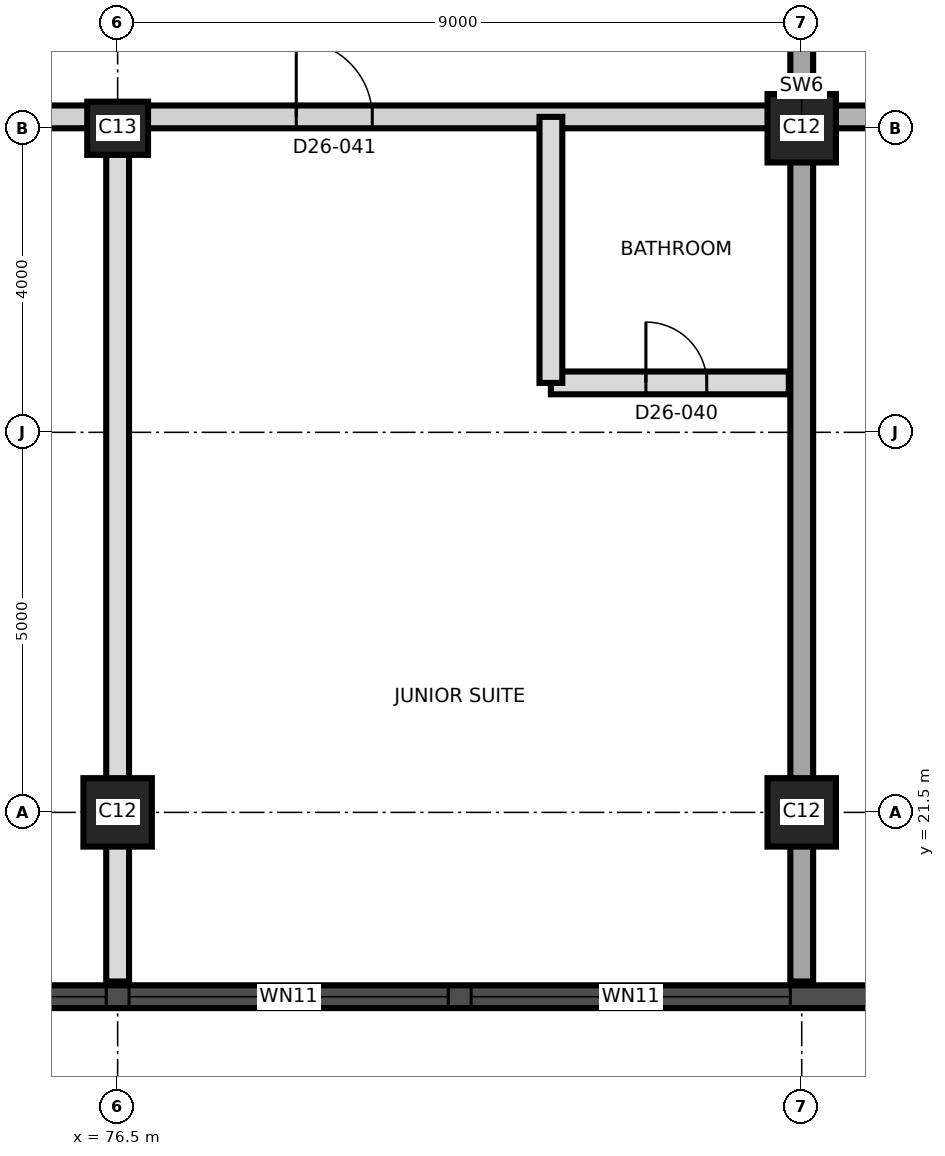
"""IFC4 building model, lengths in metres.
Left out: names, types, materials, properties, quantities, classifications, styles, units other than length and angle.
Written with IfcOpenShell. Run it as: python <this file> out.ifc"""

import sys

from ifc_helpers import new_model, si_unit, direction, frame, frame_2d, origin, origin_2d, place, context, subcontext, project, spatial, rectangle, extrude, element, fill, save


model = new_model("IFC4")
c1 = context("Model", 3, precision=1e-05, world=origin(), true_north=direction((0.0, 1.0)))
c2 = subcontext(c1, "Body", "Model", "MODEL_VIEW")
j1 = project(units=[si_unit("LENGTHUNIT", "METRE"), si_unit("PLANEANGLEUNIT", "RADIAN")], contexts=[c1])
p1 = place(None, origin())
s1 = spatial("IfcSite", under=j1, at=p1, CompositionType="ELEMENT")
p2 = place(p1, origin())
s2 = spatial("IfcBuilding", under=s1, at=p2, CompositionType="ELEMENT")
p3 = place(p2, frame((0.0, 0.0, 236.5)))
s3 = spatial("IfcBuildingStorey", under=s2, at=p3, CompositionType="ELEMENT", Elevation=236.5)
for number, where, z_axis, x_axis in (
    (1, (76.5, 21.5, 0.0), (0.0, 0.0, 1.0), (1.0, 0.0, 0.0)),
    (2, (85.5, 21.5, 0.0), (0.0, 0.0, 1.0), (1.0, 0.0, 0.0)),
):
    element("IfcColumn", number, at=place(p3, frame(where, z_axis=z_axis, x_axis=x_axis)), inside=s3, PredefinedType="COLUMN", context=c2, shape_type="SweptSolid", body=[
        extrude(rectangle(XDim=0.9, YDim=0.9, at=origin_2d()), origin(), (0.0, 0.0, 1.0), 3.7),
    ])
p4 = place(p3, frame((76.5, 30.5, 0.0), z_axis=(0.0, 0.0, 1.0), x_axis=(1.0, 0.0, 0.0)))
e3 = element("IfcColumn", 3, at=p4, inside=s3, PredefinedType="COLUMN", context=c2, shape_type="SweptSolid", body=[
    extrude(rectangle(XDim=0.8, YDim=0.7, at=origin_2d()), origin(), (0.0, 0.0, 1.0), 3.7),
])
p5 = place(p3, frame((85.5, 30.5, 0.0), z_axis=(0.0, 0.0, 1.0), x_axis=(1.0, 0.0, 0.0)))
e4 = element("IfcColumn", 4, at=p5, inside=s3, PredefinedType="COLUMN", context=c2, shape_type="SweptSolid", body=[
    extrude(rectangle(XDim=0.9, YDim=0.9, at=origin_2d()), origin(), (0.0, 0.0, 1.0), 3.7),
])
p6 = place(p3, frame((85.5, 19.275, 0.0), z_axis=(0.0, 0.0, 1.0), x_axis=(0.0, 1.0, 0.0)))
e5 = element("IfcWall", 5, at=p6, inside=s3, PredefinedType="SHEAR", context=c2, shape_type="SweptSolid", body=[
    extrude(rectangle(XDim=22.45, YDim=0.3, at=frame_2d((11.225, 0.0))), origin(), (0.0, 0.0, 1.0), 3.7),
])
p7 = place(p6, frame((12.425, 0.0, 0.0)))
e6 = element("IfcOpeningElement", 6, at=p7, cuts=e5, PredefinedType="OPENING", context=c2, shape_type="SweptSolid", body=[
    extrude(rectangle(XDim=1.4, YDim=2.1, at=frame_2d((0.7, 1.05))), frame((0.0, 0.16, 0.0), z_axis=(0.0, -1.0, 0.0), x_axis=(1.0, 0.0, 0.0)), (0.0, 0.0, 1.0), 0.32),
])
p8 = place(p3, frame((44.01, 19.075, 0.0), z_axis=(0.0, 0.0, 1.0), x_axis=(1.0, 0.0, 0.0)))
e7 = element("IfcWall", 7, at=p8, inside=s3, PredefinedType="SOLIDWALL", context=c2, shape_type="SweptSolid", body=[
    extrude(rectangle(XDim=43.478, YDim=0.3, at=frame_2d((21.739, 0.0))), origin(), (0.0, 0.0, 1.0), 3.4),
])
p9 = place(p8, frame((1.845, 0.0, 0.3)))
e8 = element("IfcOpeningElement", 8, at=p9, cuts=e7, PredefinedType="OPENING", context=c2, shape_type="SweptSolid", body=[
    extrude(rectangle(XDim=1.8, YDim=2.4, at=frame_2d((0.9, 1.2))), frame((0.0, 0.16, 0.0), z_axis=(0.0, -1.0, 0.0), x_axis=(1.0, 0.0, 0.0)), (0.0, 0.0, 1.0), 0.32),
])
p10 = place(p8, frame((5.64, 0.0, 0.9)))
e9 = element("IfcOpeningElement", 9, at=p10, cuts=e7, PredefinedType="OPENING", context=c2, shape_type="SweptSolid", body=[
    extrude(rectangle(XDim=4.2, YDim=1.5, at=frame_2d((2.1, 0.75))), frame((0.0, 0.16, 0.0), z_axis=(0.0, -1.0, 0.0), x_axis=(1.0, 0.0, 0.0)), (0.0, 0.0, 1.0), 0.32),
])
p11 = place(p8, frame((10.14, 0.0, 0.9)))
e10 = element("IfcOpeningElement", 10, at=p11, cuts=e7, PredefinedType="OPENING", context=c2, shape_type="SweptSolid", body=[
    extrude(rectangle(XDim=4.2, YDim=1.5, at=frame_2d((2.1, 0.75))), frame((0.0, 0.16, 0.0), z_axis=(0.0, -1.0, 0.0), x_axis=(1.0, 0.0, 0.0)), (0.0, 0.0, 1.0), 0.32),
])
p12 = place(p8, frame((14.64, 0.0, 0.9)))
e11 = element("IfcOpeningElement", 11, at=p12, cuts=e7, PredefinedType="OPENING", context=c2, shape_type="SweptSolid", body=[
    extrude(rectangle(XDim=4.2, YDim=1.5, at=frame_2d((2.1, 0.75))), frame((0.0, 0.16, 0.0), z_axis=(0.0, -1.0, 0.0), x_axis=(1.0, 0.0, 0.0)), (0.0, 0.0, 1.0), 0.32),
])
p13 = place(p8, frame((19.14, 0.0, 0.9)))
e12 = element("IfcOpeningElement", 12, at=p13, cuts=e7, PredefinedType="OPENING", context=c2, shape_type="SweptSolid", body=[
    extrude(rectangle(XDim=4.2, YDim=1.5, at=frame_2d((2.1, 0.75))), frame((0.0, 0.16, 0.0), z_axis=(0.0, -1.0, 0.0), x_axis=(1.0, 0.0, 0.0)), (0.0, 0.0, 1.0), 0.32),
])
p14 = place(p8, frame((23.64, 0.0, 0.9)))
e13 = element("IfcOpeningElement", 13, at=p14, cuts=e7, PredefinedType="OPENING", context=c2, shape_type="SweptSolid", body=[
    extrude(rectangle(XDim=4.2, YDim=1.5, at=frame_2d((2.1, 0.75))), frame((0.0, 0.16, 0.0), z_axis=(0.0, -1.0, 0.0), x_axis=(1.0, 0.0, 0.0)), (0.0, 0.0, 1.0), 0.32),
])
p15 = place(p8, frame((28.14, 0.0, 0.9)))
e14 = element("IfcOpeningElement", 14, at=p15, cuts=e7, PredefinedType="OPENING", context=c2, shape_type="SweptSolid", body=[
    extrude(rectangle(XDim=4.2, YDim=1.5, at=frame_2d((2.1, 0.75))), frame((0.0, 0.16, 0.0), z_axis=(0.0, -1.0, 0.0), x_axis=(1.0, 0.0, 0.0)), (0.0, 0.0, 1.0), 0.32),
])
p16 = place(p8, frame((32.64, 0.0, 0.9)))
e15 = element("IfcOpeningElement", 15, at=p16, cuts=e7, PredefinedType="OPENING", context=c2, shape_type="SweptSolid", body=[
    extrude(rectangle(XDim=4.2, YDim=1.5, at=frame_2d((2.1, 0.75))), frame((0.0, 0.16, 0.0), z_axis=(0.0, -1.0, 0.0), x_axis=(1.0, 0.0, 0.0)), (0.0, 0.0, 1.0), 0.32),
])
p17 = place(p8, frame((37.14, 0.0, 0.9)))
e16 = element("IfcOpeningElement", 16, at=p17, cuts=e7, PredefinedType="OPENING", context=c2, shape_type="SweptSolid", body=[
    extrude(rectangle(XDim=4.2, YDim=1.5, at=frame_2d((2.1, 0.75))), frame((0.0, 0.16, 0.0), z_axis=(0.0, -1.0, 0.0), x_axis=(1.0, 0.0, 0.0)), (0.0, 0.0, 1.0), 0.32),
])
p18 = place(p3, frame((82.2, 27.15, 0.0), z_axis=(0.0, 0.0, 1.0), x_axis=(1.0, 0.0, 0.0)))
e17 = element("IfcWall", 17, at=p18, inside=s3, PredefinedType="PARTITIONING", context=c2, shape_type="SweptSolid", body=[
    extrude(rectangle(XDim=3.13, YDim=0.3, at=frame_2d((1.565, 0.0))), origin(), (0.0, 0.0, 1.0), 3.4),
])
p19 = place(p18, frame((1.25, 0.0, 0.0)))
e18 = element("IfcOpeningElement", 18, at=p19, cuts=e17, PredefinedType="OPENING", context=c2, shape_type="SweptSolid", body=[
    extrude(rectangle(XDim=0.8, YDim=2.1, at=frame_2d((0.4, 1.05))), frame((0.0, 0.16, 0.0), z_axis=(0.0, -1.0, 0.0), x_axis=(1.0, 0.0, 0.0)), (0.0, 0.0, 1.0), 0.32),
])
p20 = place(p3, frame((58.55, 30.65, 0.0), z_axis=(0.0, 0.0, 1.0), x_axis=(1.0, 0.0, 0.0)))
e19 = element("IfcWall", 19, at=p20, inside=s3, PredefinedType="PARTITIONING", context=c2, shape_type="SweptSolid", body=[
    extrude(rectangle(XDim=26.78, YDim=0.3, at=frame_2d((13.39, 0.0))), origin(), (0.0, 0.0, 1.0), 3.4),
])
p21 = place(p20, frame((1.085, 0.0, 0.0)))
e20 = element("IfcOpeningElement", 20, at=p21, cuts=e19, PredefinedType="OPENING", context=c2, shape_type="SweptSolid", body=[
    extrude(rectangle(XDim=1.2, YDim=2.1, at=frame_2d((0.6, 1.05))), frame((0.0, 0.16, 0.0), z_axis=(0.0, -1.0, 0.0), x_axis=(1.0, 0.0, 0.0)), (0.0, 0.0, 1.0), 0.32),
])
p22 = place(p20, frame((4.335, 0.0, 0.0)))
e21 = element("IfcOpeningElement", 21, at=p22, cuts=e19, PredefinedType="OPENING", context=c2, shape_type="SweptSolid", body=[
    extrude(rectangle(XDim=1.0, YDim=2.1, at=frame_2d((0.5, 1.05))), frame((0.0, 0.16, 0.0), z_axis=(0.0, -1.0, 0.0), x_axis=(1.0, 0.0, 0.0)), (0.0, 0.0, 1.0), 0.32),
])
p23 = place(p20, frame((14.6, 0.0, 0.0)))
e22 = element("IfcOpeningElement", 22, at=p23, cuts=e19, PredefinedType="OPENING", context=c2, shape_type="SweptSolid", body=[
    extrude(rectangle(XDim=1.0, YDim=2.4, at=frame_2d((0.5, 1.2))), frame((0.0, 0.16, 0.0), z_axis=(0.0, -1.0, 0.0), x_axis=(1.0, 0.0, 0.0)), (0.0, 0.0, 1.0), 0.32),
])
p24 = place(p20, frame((20.3, 0.0, 0.0)))
e23 = element("IfcOpeningElement", 23, at=p24, cuts=e19, PredefinedType="OPENING", context=c2, shape_type="SweptSolid", body=[
    extrude(rectangle(XDim=1.0, YDim=2.4, at=frame_2d((0.5, 1.2))), frame((0.0, 0.16, 0.0), z_axis=(0.0, -1.0, 0.0), x_axis=(1.0, 0.0, 0.0)), (0.0, 0.0, 1.0), 0.32),
])
p25 = place(p3, frame((85.67, 30.65, 0.0), z_axis=(0.0, 0.0, 1.0), x_axis=(1.0, 0.0, 0.0)))
e24 = element("IfcWall", 24, at=p25, inside=s3, PredefinedType="SHEAR", context=c2, shape_type="SweptSolid", body=[
    extrude(rectangle(XDim=9.58, YDim=0.3, at=frame_2d((4.79, 0.0))), origin(), (0.0, 0.0, 1.0), 3.4),
])
p26 = place(p25, frame((2.08, 0.0, 0.0)))
e25 = element("IfcOpeningElement", 25, at=p26, cuts=e24, PredefinedType="OPENING", context=c2, shape_type="SweptSolid", body=[
    extrude(rectangle(XDim=1.2, YDim=2.1, at=frame_2d((0.6, 1.05))), frame((0.0, 0.16, 0.0), z_axis=(0.0, -1.0, 0.0), x_axis=(1.0, 0.0, 0.0)), (0.0, 0.0, 1.0), 0.32),
])
p27 = place(p25, frame((5.63, 0.0, 0.0)))
e26 = element("IfcOpeningElement", 26, at=p27, cuts=e24, PredefinedType="OPENING", context=c2, shape_type="SweptSolid", body=[
    extrude(rectangle(XDim=1.0, YDim=2.1, at=frame_2d((0.5, 1.05))), frame((0.0, 0.16, 0.0), z_axis=(0.0, -1.0, 0.0), x_axis=(1.0, 0.0, 0.0)), (0.0, 0.0, 1.0), 0.32),
])
p28 = place(p3, frame((76.5, 19.275, 0.0), z_axis=(0.0, 0.0, 1.0), x_axis=(0.0, 1.0, 0.0)))
e27 = element("IfcWall", 27, at=p28, inside=s3, PredefinedType="PARTITIONING", context=c2, shape_type="SweptSolid", body=[
    extrude(rectangle(XDim=11.375, YDim=0.3, at=frame_2d((5.688, 0.0))), origin(), (0.0, 0.0, 1.0), 3.4),
])
p29 = place(p3, frame((82.2, 27.15, 0.0), z_axis=(0.0, 0.0, 1.0), x_axis=(0.0, 1.0, 0.0)))
e28 = element("IfcWall", 28, at=p29, inside=s3, PredefinedType="PARTITIONING", context=c2, shape_type="SweptSolid", body=[
    extrude(rectangle(XDim=3.5, YDim=0.3, at=frame_2d((1.75, 0.0))), origin(), (0.0, 0.0, 1.0), 3.4),
])
p30 = place(p15, origin())
e29 = element("IfcWindow", 29, at=p30, inside=s3, PartitioningType="SINGLE_PANEL", PredefinedType="WINDOW", context=c2, shape_type="SweptSolid", body=[
    extrude(rectangle(XDim=4.2, YDim=1.5, at=frame_2d((2.1, 0.75))), frame((0.0, 0.03, 0.0), z_axis=(0.0, -1.0, 0.0), x_axis=(1.0, 0.0, 0.0)), (0.0, 0.0, 1.0), 0.06),
])
fill(e14, e29)
p31 = place(p16, origin())
e30 = element("IfcWindow", 30, at=p31, inside=s3, PartitioningType="SINGLE_PANEL", PredefinedType="WINDOW", context=c2, shape_type="SweptSolid", body=[
    extrude(rectangle(XDim=4.2, YDim=1.5, at=frame_2d((2.1, 0.75))), frame((0.0, 0.03, 0.0), z_axis=(0.0, -1.0, 0.0), x_axis=(1.0, 0.0, 0.0)), (0.0, 0.0, 1.0), 0.06),
])
fill(e15, e30)
p32 = place(p17, origin())
e31 = element("IfcWindow", 31, at=p32, inside=s3, PartitioningType="SINGLE_PANEL", PredefinedType="WINDOW", context=c2, shape_type="SweptSolid", body=[
    extrude(rectangle(XDim=4.2, YDim=1.5, at=frame_2d((2.1, 0.75))), frame((0.0, 0.03, 0.0), z_axis=(0.0, -1.0, 0.0), x_axis=(1.0, 0.0, 0.0)), (0.0, 0.0, 1.0), 0.06),
])
fill(e16, e31)
p33 = place(p19, origin())
e32 = element("IfcDoor", 32, at=p33, inside=s3, OperationType="SINGLE_SWING_LEFT", PredefinedType="DOOR", context=c2, shape_type="SweptSolid", body=[
    extrude(rectangle(XDim=0.8, YDim=2.1, at=frame_2d((0.4, 1.05))), frame((0.0, 0.025, 0.0), z_axis=(0.0, -1.0, 0.0), x_axis=(1.0, 0.0, 0.0)), (0.0, 0.0, 1.0), 0.05),
])
fill(e18, e32)
p34 = place(p24, origin())
e33 = element("IfcDoor", 33, at=p34, inside=s3, OperationType="SINGLE_SWING_RIGHT", PredefinedType="DOOR", context=c2, shape_type="SweptSolid", body=[
    extrude(rectangle(XDim=1.0, YDim=2.4, at=frame_2d((0.5, 1.2))), frame((0.0, 0.025, 0.0), z_axis=(0.0, -1.0, 0.0), x_axis=(1.0, 0.0, 0.0)), (0.0, 0.0, 1.0), 0.05),
])
fill(e23, e33)
save(model, sys.argv[1])
